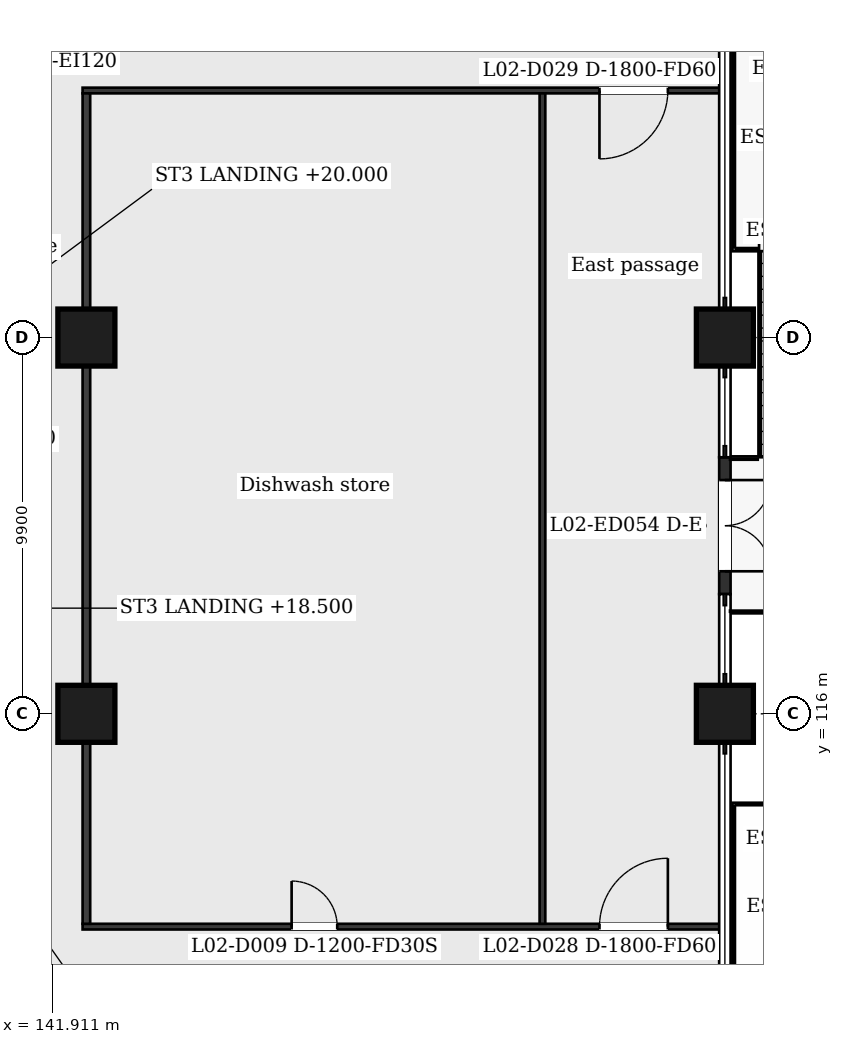
"""IFC4 building model, lengths in metres.
Left out: names, types, materials, properties, quantities, classifications, styles, units other than length and angle.
Written with IfcOpenShell. Run it as: python <this file> out.ifc"""

import sys

from ifc_helpers import new_model, si_unit, direction, frame, frame_2d, origin, origin_2d, place, context, subcontext, project, spatial, rectangle, extrude, element, fill, save


model = new_model("IFC4")
c1 = context("Model", 3, precision=1e-05, world=origin(), true_north=direction((0.0, 1.0)))
c2 = subcontext(c1, "Body", "Model", "MODEL_VIEW")
j1 = project(units=[si_unit("LENGTHUNIT", "METRE"), si_unit("PLANEANGLEUNIT", "RADIAN")], contexts=[c1])
p1 = place(None, origin())
s1 = spatial("IfcSite", under=j1, at=p1, CompositionType="ELEMENT")
p2 = place(p1, origin())
s2 = spatial("IfcBuilding", under=s1, at=p2, CompositionType="ELEMENT")
p3 = place(p2, frame((0.0, 0.0, 17.0)))
s3 = spatial("IfcBuildingStorey", under=s2, at=p3, CompositionType="ELEMENT", Elevation=17.0)
for number, where, z_axis, x_axis in (
    (1, (142.8, 116.0, 0.0), (0.0, 0.0, 1.0), (1.0, 0.0, 0.0)),
    (2, (159.6, 116.0, 0.0), (0.0, 0.0, 1.0), (1.0, 0.0, 0.0)),
    (3, (142.8, 125.9, 0.0), (0.0, 0.0, 1.0), (1.0, 0.0, 0.0)),
    (4, (159.6, 125.9, 0.0), (0.0, 0.0, 1.0), (1.0, 0.0, 0.0)),
):
    element("IfcColumn", number, at=place(p3, frame(where, z_axis=z_axis, x_axis=x_axis)), inside=s3, PredefinedType="COLUMN", context=c2, shape_type="SweptSolid", body=[
        extrude(rectangle(XDim=1.5, YDim=1.5, at=origin_2d()), origin(), (0.0, 0.0, 1.0), 6.0),
    ])
p4 = place(p3, frame((159.6, 122.75, 0.0), z_axis=(0.0, 0.0, 1.0), x_axis=(0.0, -1.0, 0.0)))
e5 = element("IfcWall", 5, at=p4, inside=s3, PredefinedType="SOLIDWALL", context=c2, shape_type="SweptSolid", body=[
    extrude(rectangle(XDim=3.6, YDim=0.3, at=frame_2d((1.8, 0.0))), origin(), (0.0, 0.0, 1.0), 5.1),
])
p5 = place(p4, frame((0.6, 0.0, 0.0)))
e6 = element("IfcOpeningElement", 6, at=p5, cuts=e5, PredefinedType="OPENING", context=c2, shape_type="SweptSolid", body=[
    extrude(rectangle(XDim=2.4, YDim=2.4, at=frame_2d((1.2, 1.2))), frame((0.0, 0.16, 0.0), z_axis=(0.0, -1.0, 0.0), x_axis=(1.0, 0.0, 0.0)), (0.0, 0.0, 1.0), 0.32),
])
p6 = place(p3, frame((142.7, 110.4, 0.0), z_axis=(0.0, 0.0, 1.0), x_axis=(1.0, 0.0, 0.0)))
e7 = element("IfcWall", 7, at=p6, inside=s3, PredefinedType="PARTITIONING", context=c2, shape_type="SweptSolid", body=[
    extrude(rectangle(XDim=16.85, YDim=0.15, at=frame_2d((8.425, 0.0))), origin(), (0.0, 0.0, 1.0), 5.5),
])
p7 = place(p6, frame((5.5, 0.0, 0.0)))
e8 = element("IfcOpeningElement", 8, at=p7, cuts=e7, PredefinedType="OPENING", context=c2, shape_type="SweptSolid", body=[
    extrude(rectangle(XDim=1.2, YDim=2.1, at=frame_2d((0.6, 1.05))), frame((0.0, 0.085, 0.0), z_axis=(0.0, -1.0, 0.0), x_axis=(1.0, 0.0, 0.0)), (0.0, 0.0, 1.0), 0.17),
])
p8 = place(p6, frame((13.6, 0.0, 0.0)))
e9 = element("IfcOpeningElement", 9, at=p8, cuts=e7, PredefinedType="OPENING", context=c2, shape_type="SweptSolid", body=[
    extrude(rectangle(XDim=1.8, YDim=2.1, at=frame_2d((0.9, 1.05))), frame((0.0, 0.085, 0.0), z_axis=(0.0, -1.0, 0.0), x_axis=(1.0, 0.0, 0.0)), (0.0, 0.0, 1.0), 0.17),
])
p9 = place(p3, frame((142.7, 132.4, 0.0), z_axis=(0.0, 0.0, 1.0), x_axis=(1.0, 0.0, 0.0)))
e10 = element("IfcWall", 10, at=p9, inside=s3, PredefinedType="PARTITIONING", context=c2, shape_type="SweptSolid", body=[
    extrude(rectangle(XDim=16.85, YDim=0.15, at=frame_2d((8.425, 0.0))), origin(), (0.0, 0.0, 1.0), 5.5),
])
p10 = place(p9, frame((13.6, 0.0, 0.0)))
e11 = element("IfcOpeningElement", 11, at=p10, cuts=e10, PredefinedType="OPENING", context=c2, shape_type="SweptSolid", body=[
    extrude(rectangle(XDim=1.8, YDim=2.1, at=frame_2d((0.9, 1.05))), frame((0.0, 0.085, 0.0), z_axis=(0.0, -1.0, 0.0), x_axis=(1.0, 0.0, 0.0)), (0.0, 0.0, 1.0), 0.17),
])
p11 = place(p3, frame((142.8, 110.475, 0.0), z_axis=(0.0, 0.0, 1.0), x_axis=(0.0, 1.0, 0.0)))
e12 = element("IfcWall", 12, at=p11, inside=s3, PredefinedType="PARTITIONING", context=c2, shape_type="SweptSolid", body=[
    extrude(rectangle(XDim=21.85, YDim=0.2, at=frame_2d((10.925, 0.0))), origin(), (0.0, 0.0, 1.0), 5.5),
])
p12 = place(p3, frame((154.8, 110.475, 0.0), z_axis=(0.0, 0.0, 1.0), x_axis=(0.0, 1.0, 0.0)))
e13 = element("IfcWall", 13, at=p12, inside=s3, PredefinedType="PARTITIONING", context=c2, shape_type="SweptSolid", body=[
    extrude(rectangle(XDim=21.85, YDim=0.15, at=frame_2d((10.925, 0.0))), origin(), (0.0, 0.0, 1.0), 5.5),
])
p13 = place(p5, origin())
e14 = element("IfcDoor", 14, at=p13, inside=s3, OperationType="DOUBLE_DOOR_DOUBLE_SWING", PredefinedType="DOOR", context=c2, shape_type="SweptSolid", body=[
    extrude(rectangle(XDim=2.4, YDim=2.4, at=frame_2d((1.2, 1.2))), frame((0.0, 0.025, 0.0), z_axis=(0.0, -1.0, 0.0), x_axis=(1.0, 0.0, 0.0)), (0.0, 0.0, 1.0), 0.05),
])
fill(e6, e14)
p14 = place(p7, origin())
e15 = element("IfcDoor", 15, at=p14, inside=s3, OperationType="SINGLE_SWING_LEFT", PredefinedType="DOOR", context=c2, shape_type="SweptSolid", body=[
    extrude(rectangle(XDim=1.2, YDim=2.1, at=frame_2d((0.6, 1.05))), frame((0.0, 0.025, 0.0), z_axis=(0.0, -1.0, 0.0), x_axis=(1.0, 0.0, 0.0)), (0.0, 0.0, 1.0), 0.05),
])
fill(e8, e15)
p15 = place(p8, origin())
e16 = element("IfcDoor", 16, at=p15, inside=s3, OperationType="SINGLE_SWING_RIGHT", PredefinedType="DOOR", context=c2, shape_type="SweptSolid", body=[
    extrude(rectangle(XDim=1.8, YDim=2.1, at=frame_2d((0.9, 1.05))), frame((0.0, 0.025, 0.0), z_axis=(0.0, -1.0, 0.0), x_axis=(1.0, 0.0, 0.0)), (0.0, 0.0, 1.0), 0.05),
])
fill(e9, e16)
p16 = place(p10, origin())
e17 = element("IfcDoor", 17, at=p16, inside=s3, OperationType="SINGLE_SWING_LEFT", PredefinedType="DOOR", context=c2, shape_type="SweptSolid", body=[
    extrude(rectangle(XDim=1.8, YDim=2.1, at=frame_2d((0.9, 1.05))), frame((0.0, 0.025, 0.0), z_axis=(0.0, -1.0, 0.0), x_axis=(1.0, 0.0, 0.0)), (0.0, 0.0, 1.0), 0.05),
])
fill(e11, e17)
save(model, sys.argv[1])
